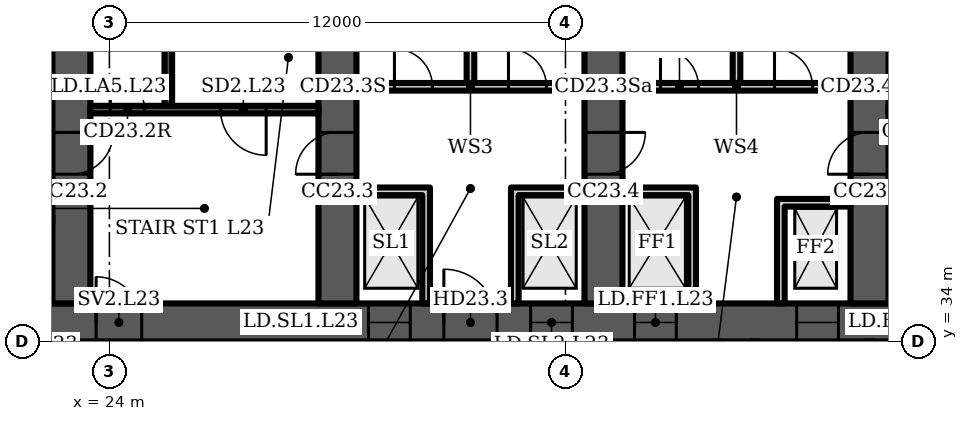
"""IFC4 building model, lengths in metres.
Left out: names, types, materials, properties, quantities, classifications, styles, units other than length and angle.
Written with IfcOpenShell. Run it as: python <this file> out.ifc"""

import sys

from ifc_helpers import new_model, si_unit, direction, frame, frame_2d, origin, place, context, subcontext, project, spatial, polyline, rectangle, outline, extrude, element, fill, save


model = new_model("IFC4")
c1 = context("Model", 3, precision=1e-05, world=origin(), true_north=direction((0.0, 1.0)))
c2 = subcontext(c1, "Body", "Model", "MODEL_VIEW")
j1 = project(units=[si_unit("LENGTHUNIT", "METRE"), si_unit("PLANEANGLEUNIT", "RADIAN")], contexts=[c1])
p1 = place(None, origin())
s1 = spatial("IfcSite", under=j1, at=p1, CompositionType="ELEMENT")
p2 = place(p1, origin())
s2 = spatial("IfcBuilding", under=s1, at=p2, CompositionType="ELEMENT")
p3 = place(p2, frame((0.0, 0.0, 103.9)))
s3 = spatial("IfcBuildingStorey", under=s2, at=p3, CompositionType="ELEMENT", Elevation=103.9)
p4 = place(p3, frame((16.0, 34.5, 0.0), z_axis=(0.0, 0.0, 1.0), x_axis=(1.0, 0.0, 0.0)))
e1 = element("IfcWall", 1, at=p4, inside=s3, PredefinedType="SHEAR", context=c2, shape_type="SweptSolid", body=[
    extrude(rectangle(XDim=49.0, YDim=1.0, at=frame_2d((24.5, 0.0))), origin(), (0.0, 0.0, 1.0), 3.6),
])
p5 = place(p4, frame((1.2, 0.0, 0.0)))
e2 = element("IfcOpeningElement", 2, at=p5, cuts=e1, PredefinedType="OPENING", context=c2, shape_type="SweptSolid", body=[
    extrude(rectangle(XDim=1.1, YDim=2.1, at=frame_2d((0.55, 1.05))), frame((0.0, 0.51, 0.0), z_axis=(0.0, -1.0, 0.0), x_axis=(1.0, 0.0, 0.0)), (0.0, 0.0, 1.0), 1.02),
])
p6 = place(p4, frame((5.083, 0.0, 0.0)))
e3 = element("IfcOpeningElement", 3, at=p6, cuts=e1, PredefinedType="OPENING", context=c2, shape_type="SweptSolid", body=[
    extrude(rectangle(XDim=1.1, YDim=2.1, at=frame_2d((0.55, 1.05))), frame((0.0, 0.51, 0.0), z_axis=(0.0, -1.0, 0.0), x_axis=(1.0, 0.0, 0.0)), (0.0, 0.0, 1.0), 1.02),
])
p7 = place(p4, frame((2.933, 0.0, 0.0)))
e4 = element("IfcOpeningElement", 4, at=p7, cuts=e1, PredefinedType="OPENING", context=c2, shape_type="SweptSolid", body=[
    extrude(rectangle(XDim=1.4, YDim=2.1, at=frame_2d((0.7, 1.05))), frame((0.0, 0.51, 0.0), z_axis=(0.0, -1.0, 0.0), x_axis=(1.0, 0.0, 0.0)), (0.0, 0.0, 1.0), 1.02),
])
p8 = place(p4, frame((7.65, 0.0, 0.0)))
e5 = element("IfcOpeningElement", 5, at=p8, cuts=e1, PredefinedType="OPENING", context=c2, shape_type="SweptSolid", body=[
    extrude(rectangle(XDim=1.2, YDim=2.1, at=frame_2d((0.6, 1.05))), frame((0.0, 0.51, 0.0), z_axis=(0.0, -1.0, 0.0), x_axis=(1.0, 0.0, 0.0)), (0.0, 0.0, 1.0), 1.02),
])
p9 = place(p4, frame((14.817, 0.0, 0.0)))
e6 = element("IfcOpeningElement", 6, at=p9, cuts=e1, PredefinedType="OPENING", context=c2, shape_type="SweptSolid", body=[
    extrude(rectangle(XDim=1.1, YDim=2.1, at=frame_2d((0.55, 1.05))), frame((0.0, 0.51, 0.0), z_axis=(0.0, -1.0, 0.0), x_axis=(1.0, 0.0, 0.0)), (0.0, 0.0, 1.0), 1.02),
])
p10 = place(p4, frame((19.083, 0.0, 0.0)))
e7 = element("IfcOpeningElement", 7, at=p10, cuts=e1, PredefinedType="OPENING", context=c2, shape_type="SweptSolid", body=[
    extrude(rectangle(XDim=1.1, YDim=2.1, at=frame_2d((0.55, 1.05))), frame((0.0, 0.51, 0.0), z_axis=(0.0, -1.0, 0.0), x_axis=(1.0, 0.0, 0.0)), (0.0, 0.0, 1.0), 1.02),
])
p11 = place(p4, frame((16.8, 0.0, 0.0)))
e8 = element("IfcOpeningElement", 8, at=p11, cuts=e1, PredefinedType="OPENING", context=c2, shape_type="SweptSolid", body=[
    extrude(rectangle(XDim=1.4, YDim=2.1, at=frame_2d((0.7, 1.05))), frame((0.0, 0.51, 0.0), z_axis=(0.0, -1.0, 0.0), x_axis=(1.0, 0.0, 0.0)), (0.0, 0.0, 1.0), 1.02),
])
p12 = place(p4, frame((21.817, 0.0, 0.0)))
e9 = element("IfcOpeningElement", 9, at=p12, cuts=e1, PredefinedType="OPENING", context=c2, shape_type="SweptSolid", body=[
    extrude(rectangle(XDim=1.1, YDim=2.1, at=frame_2d((0.55, 1.05))), frame((0.0, 0.51, 0.0), z_axis=(0.0, -1.0, 0.0), x_axis=(1.0, 0.0, 0.0)), (0.0, 0.0, 1.0), 1.02),
])
p13 = place(p4, frame((26.083, 0.0, 0.0)))
e10 = element("IfcOpeningElement", 10, at=p13, cuts=e1, PredefinedType="OPENING", context=c2, shape_type="SweptSolid", body=[
    extrude(rectangle(XDim=1.1, YDim=2.1, at=frame_2d((0.55, 1.05))), frame((0.0, 0.51, 0.0), z_axis=(0.0, -1.0, 0.0), x_axis=(1.0, 0.0, 0.0)), (0.0, 0.0, 1.0), 1.02),
])
p14 = place(p4, frame((33.15, 0.0, 0.0)))
e11 = element("IfcOpeningElement", 11, at=p14, cuts=e1, PredefinedType="OPENING", context=c2, shape_type="SweptSolid", body=[
    extrude(rectangle(XDim=1.2, YDim=2.1, at=frame_2d((0.6, 1.05))), frame((0.0, 0.51, 0.0), z_axis=(0.0, -1.0, 0.0), x_axis=(1.0, 0.0, 0.0)), (0.0, 0.0, 1.0), 1.02),
])
p15 = place(p4, frame((37.8, 0.0, 0.0)))
e12 = element("IfcOpeningElement", 12, at=p15, cuts=e1, PredefinedType="OPENING", context=c2, shape_type="SweptSolid", body=[
    extrude(rectangle(XDim=1.4, YDim=2.1, at=frame_2d((0.7, 1.05))), frame((0.0, 0.51, 0.0), z_axis=(0.0, -1.0, 0.0), x_axis=(1.0, 0.0, 0.0)), (0.0, 0.0, 1.0), 1.02),
])
p16 = place(p4, frame((42.817, 0.0, 0.0)))
e13 = element("IfcOpeningElement", 13, at=p16, cuts=e1, PredefinedType="OPENING", context=c2, shape_type="SweptSolid", body=[
    extrude(rectangle(XDim=1.1, YDim=2.1, at=frame_2d((0.55, 1.05))), frame((0.0, 0.51, 0.0), z_axis=(0.0, -1.0, 0.0), x_axis=(1.0, 0.0, 0.0)), (0.0, 0.0, 1.0), 1.02),
])
p17 = place(p4, frame((46.7, 0.0, 0.0)))
e14 = element("IfcOpeningElement", 14, at=p17, cuts=e1, PredefinedType="OPENING", context=c2, shape_type="SweptSolid", body=[
    extrude(rectangle(XDim=1.1, YDim=2.1, at=frame_2d((0.55, 1.05))), frame((0.0, 0.51, 0.0), z_axis=(0.0, -1.0, 0.0), x_axis=(1.0, 0.0, 0.0)), (0.0, 0.0, 1.0), 1.02),
])
p18 = place(p4, frame((44.667, 0.0, 0.0)))
e15 = element("IfcOpeningElement", 15, at=p18, cuts=e1, PredefinedType="OPENING", context=c2, shape_type="SweptSolid", body=[
    extrude(rectangle(XDim=1.4, YDim=2.1, at=frame_2d((0.7, 1.05))), frame((0.0, 0.51, 0.0), z_axis=(0.0, -1.0, 0.0), x_axis=(1.0, 0.0, 0.0)), (0.0, 0.0, 1.0), 1.02),
])
p19 = place(p3, frame((23.0, 35.0, 0.0), z_axis=(0.0, 0.0, 1.0), x_axis=(0.0, 1.0, 0.0)))
e16 = element("IfcWall", 16, at=p19, inside=s3, PredefinedType="SHEAR", context=c2, shape_type="SweptSolid", body=[
    extrude(rectangle(XDim=13.352, YDim=1.0, at=frame_2d((6.676, 0.0))), origin(), (0.0, 0.0, 1.0), 3.6),
])
p20 = place(p19, frame((10.426, 0.0, 0.0)))
e17 = element("IfcOpeningElement", 17, at=p20, cuts=e16, PredefinedType="OPENING", context=c2, shape_type="SweptSolid", body=[
    extrude(rectangle(XDim=1.0, YDim=2.1, at=frame_2d((0.5, 1.05))), frame((0.0, 0.51, 0.0), z_axis=(0.0, -1.0, 0.0), x_axis=(1.0, 0.0, 0.0)), (0.0, 0.0, 1.0), 1.02),
])
p21 = place(p19, frame((3.4, 0.0, 0.0)))
e18 = element("IfcOpeningElement", 18, at=p21, cuts=e16, PredefinedType="OPENING", context=c2, shape_type="SweptSolid", body=[
    extrude(rectangle(XDim=1.1, YDim=2.1, at=frame_2d((0.55, 1.05))), frame((0.0, 0.51, 0.0), z_axis=(0.0, -1.0, 0.0), x_axis=(1.0, 0.0, 0.0)), (0.0, 0.0, 1.0), 1.02),
])
p22 = place(p3, frame((30.0, 35.0, 0.0), z_axis=(0.0, 0.0, 1.0), x_axis=(0.0, 1.0, 0.0)))
e19 = element("IfcWall", 19, at=p22, inside=s3, PredefinedType="SHEAR", context=c2, shape_type="SweptSolid", body=[
    extrude(rectangle(XDim=13.965, YDim=1.0, at=frame_2d((6.982, 0.0))), origin(), (0.0, 0.0, 1.0), 3.6),
])
p23 = place(p22, frame((3.4, 0.0, 0.0)))
e20 = element("IfcOpeningElement", 20, at=p23, cuts=e19, PredefinedType="OPENING", context=c2, shape_type="SweptSolid", body=[
    extrude(rectangle(XDim=1.1, YDim=2.1, at=frame_2d((0.55, 1.05))), frame((0.0, 0.51, 0.0), z_axis=(0.0, -1.0, 0.0), x_axis=(1.0, 0.0, 0.0)), (0.0, 0.0, 1.0), 1.02),
])
p24 = place(p3, frame((37.0, 35.0, 0.0), z_axis=(0.0, 0.0, 1.0), x_axis=(0.0, 1.0, 0.0)))
e21 = element("IfcWall", 21, at=p24, inside=s3, PredefinedType="SHEAR", context=c2, shape_type="SweptSolid", body=[
    extrude(rectangle(XDim=14.577, YDim=1.0, at=frame_2d((7.289, 0.0))), origin(), (0.0, 0.0, 1.0), 3.6),
])
p25 = place(p24, frame((3.4, 0.0, 0.0)))
e22 = element("IfcOpeningElement", 22, at=p25, cuts=e21, PredefinedType="OPENING", context=c2, shape_type="SweptSolid", body=[
    extrude(rectangle(XDim=1.1, YDim=2.1, at=frame_2d((0.55, 1.05))), frame((0.0, 0.51, 0.0), z_axis=(0.0, -1.0, 0.0), x_axis=(1.0, 0.0, 0.0)), (0.0, 0.0, 1.0), 1.02),
])
p26 = place(p24, frame((9.8, 0.0, 0.0)))
e23 = element("IfcOpeningElement", 23, at=p26, cuts=e21, PredefinedType="OPENING", context=c2, shape_type="SweptSolid", body=[
    extrude(rectangle(XDim=1.0, YDim=2.1, at=frame_2d((0.5, 1.05))), frame((0.0, 0.51, 0.0), z_axis=(0.0, -1.0, 0.0), x_axis=(1.0, 0.0, 0.0)), (0.0, 0.0, 1.0), 1.02),
])
p27 = place(p3, frame((44.0, 35.0, 0.0), z_axis=(0.0, 0.0, 1.0), x_axis=(0.0, 1.0, 0.0)))
e24 = element("IfcWall", 24, at=p27, inside=s3, PredefinedType="SHEAR", context=c2, shape_type="SweptSolid", body=[
    extrude(rectangle(XDim=14.577, YDim=1.0, at=frame_2d((7.289, 0.0))), origin(), (0.0, 0.0, 1.0), 3.6),
])
p28 = place(p27, frame((3.4, 0.0, 0.0)))
e25 = element("IfcOpeningElement", 25, at=p28, cuts=e24, PredefinedType="OPENING", context=c2, shape_type="SweptSolid", body=[
    extrude(rectangle(XDim=1.1, YDim=2.1, at=frame_2d((0.55, 1.05))), frame((0.0, 0.51, 0.0), z_axis=(0.0, -1.0, 0.0), x_axis=(1.0, 0.0, 0.0)), (0.0, 0.0, 1.0), 1.02),
])
p29 = place(p27, frame((9.8, 0.0, 0.0)))
e26 = element("IfcOpeningElement", 26, at=p29, cuts=e24, PredefinedType="OPENING", context=c2, shape_type="SweptSolid", body=[
    extrude(rectangle(XDim=1.0, YDim=2.1, at=frame_2d((0.5, 1.05))), frame((0.0, 0.51, 0.0), z_axis=(0.0, -1.0, 0.0), x_axis=(1.0, 0.0, 0.0)), (0.0, 0.0, 1.0), 1.02),
])
p30 = place(p3, frame((23.5, 40.1, 0.0), z_axis=(0.0, 0.0, 1.0), x_axis=(1.0, 0.0, 0.0)))
e27 = element("IfcWall", 27, at=p30, inside=s3, PredefinedType="SHEAR", context=c2, shape_type="SweptSolid", body=[
    extrude(rectangle(XDim=6.0, YDim=0.2, at=frame_2d((3.0, 0.0))), origin(), (0.0, 0.0, 1.0), 3.2),
])
p31 = place(p30, frame((3.425, 0.0, 0.0)))
e28 = element("IfcOpeningElement", 28, at=p31, cuts=e27, PredefinedType="OPENING", context=c2, shape_type="SweptSolid", body=[
    extrude(rectangle(XDim=1.2, YDim=2.1, at=frame_2d((0.6, 1.05))), frame((0.0, 0.11, 0.0), z_axis=(0.0, -1.0, 0.0), x_axis=(1.0, 0.0, 0.0)), (0.0, 0.0, 1.0), 0.22),
])
p32 = place(p30, frame((0.525, 0.0, 0.0)))
e29 = element("IfcOpeningElement", 29, at=p32, cuts=e27, PredefinedType="OPENING", context=c2, shape_type="SweptSolid", body=[
    extrude(rectangle(XDim=0.9, YDim=2.1, at=frame_2d((0.45, 1.05))), frame((0.0, 0.11, 0.0), z_axis=(0.0, -1.0, 0.0), x_axis=(1.0, 0.0, 0.0)), (0.0, 0.0, 1.0), 0.22),
])
p33 = place(p3, frame((25.55, 40.2, 0.0), z_axis=(0.0, 0.0, 1.0), x_axis=(0.0, 1.0, 0.0)))
e30 = element("IfcWall", 30, at=p33, inside=s3, PredefinedType="SHEAR", context=c2, shape_type="SweptSolid", body=[
    extrude(rectangle(XDim=7.2, YDim=0.2, at=frame_2d((3.6, 0.0))), origin(), (0.0, 0.0, 1.0), 3.2),
])
p34 = place(p3, frame((30.5, 40.7, 0.0), z_axis=(0.0, 0.0, 1.0), x_axis=(1.0, 0.0, 0.0)))
e31 = element("IfcWall", 31, at=p34, inside=s3, PredefinedType="PARTITIONING", context=c2, shape_type="SweptSolid", body=[
    extrude(rectangle(XDim=6.0, YDim=0.2, at=frame_2d((3.0, 0.0))), origin(), (0.0, 0.0, 1.0), 3.2),
])
p35 = place(p34, frame((1.0, 0.0, 0.0)))
e32 = element("IfcOpeningElement", 32, at=p35, cuts=e31, PredefinedType="OPENING", context=c2, shape_type="SweptSolid", body=[
    extrude(rectangle(XDim=1.0, YDim=2.1, at=frame_2d((0.5, 1.05))), frame((0.0, 0.11, 0.0), z_axis=(0.0, -1.0, 0.0), x_axis=(1.0, 0.0, 0.0)), (0.0, 0.0, 1.0), 0.22),
])
p36 = place(p34, frame((4.0, 0.0, 0.0)))
e33 = element("IfcOpeningElement", 33, at=p36, cuts=e31, PredefinedType="OPENING", context=c2, shape_type="SweptSolid", body=[
    extrude(rectangle(XDim=1.0, YDim=2.1, at=frame_2d((0.5, 1.05))), frame((0.0, 0.11, 0.0), z_axis=(0.0, -1.0, 0.0), x_axis=(1.0, 0.0, 0.0)), (0.0, 0.0, 1.0), 0.22),
])
p37 = place(p3, origin())
e34 = element("IfcWall", 34, at=p37, inside=s3, PredefinedType="PARTITIONING", context=c2, shape_type="SweptSolid", body=[
    extrude(outline(polyline([(32.233, 37.85), (30.5, 37.85), (30.5, 38.05), (32.233, 38.05), (32.433, 38.05), (32.433, 35.0), (32.233, 35.0), (32.233, 37.85)])), origin(), (0.0, 0.0, 1.0), 3.2),
])
p38 = place(p3, origin())
e35 = element("IfcWall", 35, at=p38, inside=s3, PredefinedType="PARTITIONING", context=c2, shape_type="SweptSolid", body=[
    extrude(outline(polyline([(34.567, 38.05), (34.767, 38.05), (36.5, 38.05), (36.5, 37.85), (34.767, 37.85), (34.767, 35.0), (34.567, 35.0), (34.567, 38.05)])), origin(), (0.0, 0.0, 1.0), 3.2),
])
p39 = place(p3, frame((33.5, 40.8, 0.0), z_axis=(0.0, 0.0, 1.0), x_axis=(0.0, 1.0, 0.0)))
e36 = element("IfcWall", 36, at=p39, inside=s3, PredefinedType="PARTITIONING", context=c2, shape_type="SweptSolid", body=[
    extrude(rectangle(XDim=8.232, YDim=0.2, at=frame_2d((4.116, 0.0))), origin(), (0.0, 0.0, 1.0), 3.2),
])
p40 = place(p3, frame((37.5, 40.7, 0.0), z_axis=(0.0, 0.0, 1.0), x_axis=(1.0, 0.0, 0.0)))
e37 = element("IfcWall", 37, at=p40, inside=s3, PredefinedType="PARTITIONING", context=c2, shape_type="SweptSolid", body=[
    extrude(rectangle(XDim=6.0, YDim=0.2, at=frame_2d((3.0, 0.0))), origin(), (0.0, 0.0, 1.0), 3.2),
])
p41 = place(p40, frame((1.0, 0.0, 0.0)))
e38 = element("IfcOpeningElement", 38, at=p41, cuts=e37, PredefinedType="OPENING", context=c2, shape_type="SweptSolid", body=[
    extrude(rectangle(XDim=1.0, YDim=2.1, at=frame_2d((0.5, 1.05))), frame((0.0, 0.11, 0.0), z_axis=(0.0, -1.0, 0.0), x_axis=(1.0, 0.0, 0.0)), (0.0, 0.0, 1.0), 0.22),
])
p42 = place(p40, frame((4.0, 0.0, 0.0)))
e39 = element("IfcOpeningElement", 39, at=p42, cuts=e37, PredefinedType="OPENING", context=c2, shape_type="SweptSolid", body=[
    extrude(rectangle(XDim=1.0, YDim=2.1, at=frame_2d((0.5, 1.05))), frame((0.0, 0.11, 0.0), z_axis=(0.0, -1.0, 0.0), x_axis=(1.0, 0.0, 0.0)), (0.0, 0.0, 1.0), 0.22),
])
p43 = place(p3, origin())
e40 = element("IfcWall", 40, at=p43, inside=s3, PredefinedType="PARTITIONING", context=c2, shape_type="SweptSolid", body=[
    extrude(outline(polyline([(41.567, 37.75), (41.767, 37.75), (43.5, 37.75), (43.5, 37.55), (41.767, 37.55), (41.767, 35.0), (41.567, 35.0), (41.567, 37.75)])), origin(), (0.0, 0.0, 1.0), 3.2),
])
p44 = place(p3, origin())
e41 = element("IfcWall", 41, at=p44, inside=s3, PredefinedType="PARTITIONING", context=c2, shape_type="SweptSolid", body=[
    extrude(outline(polyline([(39.233, 37.85), (37.5, 37.85), (37.5, 38.05), (39.233, 38.05), (39.433, 38.05), (39.433, 35.0), (39.233, 35.0), (39.233, 37.85)])), origin(), (0.0, 0.0, 1.0), 3.2),
])
p45 = place(p3, frame((40.5, 40.8, 0.0), z_axis=(0.0, 0.0, 1.0), x_axis=(0.0, 1.0, 0.0)))
e42 = element("IfcWall", 42, at=p45, inside=s3, PredefinedType="PARTITIONING", context=c2, shape_type="SweptSolid", body=[
    extrude(rectangle(XDim=8.844, YDim=0.2, at=frame_2d((4.422, 0.0))), origin(), (0.0, 0.0, 1.0), 3.2),
])
p46 = place(p31, origin())
e43 = element("IfcDoor", 43, at=p46, inside=s3, OperationType="SINGLE_SWING_RIGHT", PredefinedType="DOOR", context=c2, shape_type="SweptSolid", body=[
    extrude(rectangle(XDim=1.2, YDim=2.1, at=frame_2d((0.6, 1.05))), frame((0.0, 0.025, 0.0), z_axis=(0.0, -1.0, 0.0), x_axis=(1.0, 0.0, 0.0)), (0.0, 0.0, 1.0), 0.05),
])
fill(e28, e43)
p47 = place(p32, origin())
e44 = element("IfcDoor", 44, at=p47, inside=s3, OperationType="SINGLE_SWING_LEFT", PredefinedType="DOOR", context=c2, shape_type="SweptSolid", body=[
    extrude(rectangle(XDim=0.9, YDim=2.1, at=frame_2d((0.45, 1.05))), frame((0.0, 0.025, 0.0), z_axis=(0.0, -1.0, 0.0), x_axis=(1.0, 0.0, 0.0)), (0.0, 0.0, 1.0), 0.05),
])
fill(e29, e44)
p48 = place(p8, origin())
e45 = element("IfcDoor", 45, at=p48, inside=s3, OperationType="SINGLE_SWING_LEFT", PredefinedType="DOOR", context=c2, shape_type="SweptSolid", body=[
    extrude(rectangle(XDim=1.2, YDim=2.1, at=frame_2d((0.6, 1.05))), frame((0.0, 0.025, 0.0), z_axis=(0.0, -1.0, 0.0), x_axis=(1.0, 0.0, 0.0)), (0.0, 0.0, 1.0), 0.05),
])
fill(e5, e45)
p49 = place(p9, origin())
e46 = element("IfcDoor", 46, at=p49, inside=s3, OperationType="DOUBLE_DOOR_SLIDING", PredefinedType="DOOR", context=c2, shape_type="SweptSolid", body=[
    extrude(rectangle(XDim=1.1, YDim=2.1, at=frame_2d((0.55, 1.05))), frame((0.0, 0.025, 0.0), z_axis=(0.0, -1.0, 0.0), x_axis=(1.0, 0.0, 0.0)), (0.0, 0.0, 1.0), 0.05),
])
fill(e6, e46)
p50 = place(p10, origin())
e47 = element("IfcDoor", 47, at=p50, inside=s3, OperationType="DOUBLE_DOOR_SLIDING", PredefinedType="DOOR", context=c2, shape_type="SweptSolid", body=[
    extrude(rectangle(XDim=1.1, YDim=2.1, at=frame_2d((0.55, 1.05))), frame((0.0, 0.025, 0.0), z_axis=(0.0, -1.0, 0.0), x_axis=(1.0, 0.0, 0.0)), (0.0, 0.0, 1.0), 0.05),
])
fill(e7, e47)
p51 = place(p11, origin())
e48 = element("IfcDoor", 48, at=p51, inside=s3, OperationType="DOUBLE_DOOR_SINGLE_SWING", PredefinedType="DOOR", context=c2, shape_type="SweptSolid", body=[
    extrude(rectangle(XDim=1.4, YDim=2.1, at=frame_2d((0.7, 1.05))), frame((0.0, 0.025, 0.0), z_axis=(0.0, -1.0, 0.0), x_axis=(1.0, 0.0, 0.0)), (0.0, 0.0, 1.0), 0.05),
])
fill(e8, e48)
p52 = place(p35, origin())
e49 = element("IfcDoor", 49, at=p52, inside=s3, OperationType="SINGLE_SWING_LEFT", PredefinedType="DOOR", context=c2, shape_type="SweptSolid", body=[
    extrude(rectangle(XDim=1.0, YDim=2.1, at=frame_2d((0.5, 1.05))), frame((0.0, 0.025, 0.0), z_axis=(0.0, -1.0, 0.0), x_axis=(1.0, 0.0, 0.0)), (0.0, 0.0, 1.0), 0.05),
])
fill(e32, e49)
p53 = place(p36, origin())
e50 = element("IfcDoor", 50, at=p53, inside=s3, OperationType="SINGLE_SWING_LEFT", PredefinedType="DOOR", context=c2, shape_type="SweptSolid", body=[
    extrude(rectangle(XDim=1.0, YDim=2.1, at=frame_2d((0.5, 1.05))), frame((0.0, 0.025, 0.0), z_axis=(0.0, -1.0, 0.0), x_axis=(1.0, 0.0, 0.0)), (0.0, 0.0, 1.0), 0.05),
])
fill(e33, e50)
p54 = place(p12, origin())
e51 = element("IfcDoor", 51, at=p54, inside=s3, OperationType="DOUBLE_DOOR_SLIDING", PredefinedType="DOOR", context=c2, shape_type="SweptSolid", body=[
    extrude(rectangle(XDim=1.1, YDim=2.1, at=frame_2d((0.55, 1.05))), frame((0.0, 0.025, 0.0), z_axis=(0.0, -1.0, 0.0), x_axis=(1.0, 0.0, 0.0)), (0.0, 0.0, 1.0), 0.05),
])
fill(e9, e51)
p55 = place(p13, origin())
e52 = element("IfcDoor", 52, at=p55, inside=s3, OperationType="DOUBLE_DOOR_SLIDING", PredefinedType="DOOR", context=c2, shape_type="SweptSolid", body=[
    extrude(rectangle(XDim=1.1, YDim=2.1, at=frame_2d((0.55, 1.05))), frame((0.0, 0.025, 0.0), z_axis=(0.0, -1.0, 0.0), x_axis=(1.0, 0.0, 0.0)), (0.0, 0.0, 1.0), 0.05),
])
fill(e10, e52)
p56 = place(p41, origin())
e53 = element("IfcDoor", 53, at=p56, inside=s3, OperationType="SINGLE_SWING_LEFT", PredefinedType="DOOR", context=c2, shape_type="SweptSolid", body=[
    extrude(rectangle(XDim=1.0, YDim=2.1, at=frame_2d((0.5, 1.05))), frame((0.0, 0.025, 0.0), z_axis=(0.0, -1.0, 0.0), x_axis=(1.0, 0.0, 0.0)), (0.0, 0.0, 1.0), 0.05),
])
fill(e38, e53)
p57 = place(p42, origin())
e54 = element("IfcDoor", 54, at=p57, inside=s3, OperationType="SINGLE_SWING_LEFT", PredefinedType="DOOR", context=c2, shape_type="SweptSolid", body=[
    extrude(rectangle(XDim=1.0, YDim=2.1, at=frame_2d((0.5, 1.05))), frame((0.0, 0.025, 0.0), z_axis=(0.0, -1.0, 0.0), x_axis=(1.0, 0.0, 0.0)), (0.0, 0.0, 1.0), 0.05),
])
fill(e39, e54)
p58 = place(p21, origin())
e55 = element("IfcDoor", 55, at=p58, inside=s3, OperationType="SINGLE_SWING_RIGHT", PredefinedType="DOOR", context=c2, shape_type="SweptSolid", body=[
    extrude(rectangle(XDim=1.1, YDim=2.1, at=frame_2d((0.55, 1.05))), frame((0.0, 0.025, 0.0), z_axis=(0.0, -1.0, 0.0), x_axis=(1.0, 0.0, 0.0)), (0.0, 0.0, 1.0), 0.05),
])
fill(e18, e55)
p59 = place(p23, origin())
e56 = element("IfcDoor", 56, at=p59, inside=s3, OperationType="SINGLE_SWING_LEFT", PredefinedType="DOOR", context=c2, shape_type="SweptSolid", body=[
    extrude(rectangle(XDim=1.1, YDim=2.1, at=frame_2d((0.55, 1.05))), frame((0.0, 0.025, 0.0), z_axis=(0.0, -1.0, 0.0), x_axis=(1.0, 0.0, 0.0)), (0.0, 0.0, 1.0), 0.05),
])
fill(e20, e56)
p60 = place(p25, origin())
e57 = element("IfcDoor", 57, at=p60, inside=s3, OperationType="SINGLE_SWING_RIGHT", PredefinedType="DOOR", context=c2, shape_type="SweptSolid", body=[
    extrude(rectangle(XDim=1.1, YDim=2.1, at=frame_2d((0.55, 1.05))), frame((0.0, 0.025, 0.0), z_axis=(0.0, -1.0, 0.0), x_axis=(1.0, 0.0, 0.0)), (0.0, 0.0, 1.0), 0.05),
])
fill(e22, e57)
p61 = place(p28, origin())
e58 = element("IfcDoor", 58, at=p61, inside=s3, OperationType="SINGLE_SWING_LEFT", PredefinedType="DOOR", context=c2, shape_type="SweptSolid", body=[
    extrude(rectangle(XDim=1.1, YDim=2.1, at=frame_2d((0.55, 1.05))), frame((0.0, 0.025, 0.0), z_axis=(0.0, -1.0, 0.0), x_axis=(1.0, 0.0, 0.0)), (0.0, 0.0, 1.0), 0.05),
])
fill(e25, e58)
save(model, sys.argv[1])
